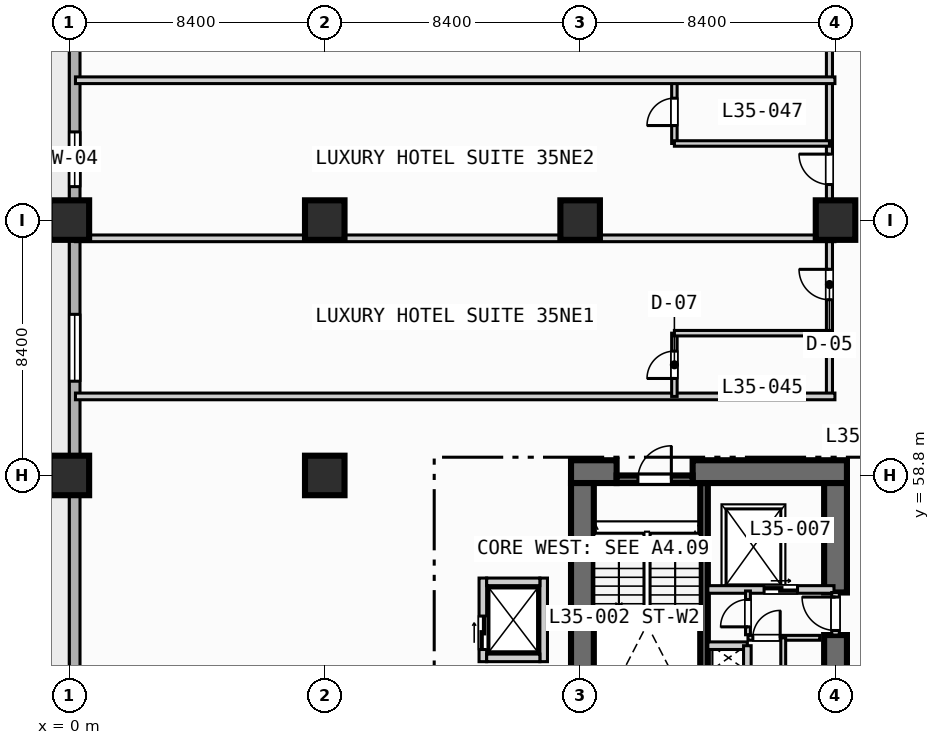
"""IFC4 building model, lengths in metres.
Left out: names, types, materials, properties, quantities, classifications, styles, units other than length and angle.
Written with IfcOpenShell. Run it as: python <this file> out.ifc"""

import sys

from ifc_helpers import new_model, si_unit, direction, frame, frame_2d, origin, origin_2d, place, context, subcontext, project, spatial, rectangle, extrude, element, fill, save


model = new_model("IFC4")
c1 = context("Model", 3, precision=1e-05, world=origin(), true_north=direction((0.0, 1.0)))
c2 = subcontext(c1, "Body", "Model", "MODEL_VIEW")
j1 = project(units=[si_unit("LENGTHUNIT", "METRE"), si_unit("PLANEANGLEUNIT", "RADIAN")], contexts=[c1])
p1 = place(None, origin())
s1 = spatial("IfcSite", under=j1, at=p1, CompositionType="ELEMENT")
p2 = place(p1, origin())
s2 = spatial("IfcBuilding", under=s1, at=p2, CompositionType="ELEMENT")
p3 = place(p2, frame((0.0, 0.0, 145.6)))
s3 = spatial("IfcBuildingStorey", under=s2, at=p3, CompositionType="ELEMENT", Elevation=145.6)
p4 = place(p3, frame((20.875, 50.5, 0.0), z_axis=(0.0, 0.0, 1.0), x_axis=(0.0, 1.0, 0.0)))
e1 = element("IfcWall", 1, at=p4, inside=s3, PredefinedType="SOLIDWALL", context=c2, shape_type="SweptSolid", body=[
    extrude(rectangle(XDim=8.05, YDim=0.25, at=frame_2d((4.025, 0.0))), origin(), (0.0, 0.0, 1.0), 3.55),
])
p5 = place(p3, frame((16.5, 58.925, 0.0), z_axis=(0.0, 0.0, 1.0), x_axis=(1.0, 0.0, 0.0)))
e2 = element("IfcWall", 2, at=p5, inside=s3, PredefinedType="SHEAR", context=c2, shape_type="SweptSolid", body=[
    extrude(rectangle(XDim=1.5, YDim=0.75, at=frame_2d((0.75, 0.0))), origin(), (0.0, 0.0, 1.0), 3.55),
])
p6 = place(p3, frame((20.5, 58.925, 0.0), z_axis=(0.0, 0.0, 1.0), x_axis=(1.0, 0.0, 0.0)))
e3 = element("IfcWall", 3, at=p6, inside=s3, PredefinedType="SHEAR", context=c2, shape_type="SweptSolid", body=[
    extrude(rectangle(XDim=5.075, YDim=0.75, at=frame_2d((2.538, 0.0))), origin(), (0.0, 0.0, 1.0), 3.55),
])
p7 = place(p3, frame((16.875, 42.2, 0.0), z_axis=(0.0, 0.0, 1.0), x_axis=(0.0, 1.0, 0.0)))
e4 = element("IfcWall", 4, at=p7, inside=s3, PredefinedType="SHEAR", context=c2, shape_type="SweptSolid", body=[
    extrude(rectangle(XDim=16.35, YDim=0.75, at=frame_2d((8.175, 0.0))), origin(), (0.0, 0.0, 1.0), 3.55),
])
p8 = place(p3, frame((25.2, 52.28, 0.0), z_axis=(0.0, 0.0, 1.0), x_axis=(0.0, 1.0, 0.0)))
e5 = element("IfcWall", 5, at=p8, inside=s3, PredefinedType="SHEAR", context=c2, shape_type="SweptSolid", body=[
    extrude(rectangle(XDim=1.27, YDim=0.75, at=frame_2d((0.635, 0.0))), origin(), (0.0, 0.0, 1.0), 3.55),
])
p9 = place(p3, frame((25.2, 54.95, 0.0), z_axis=(0.0, 0.0, 1.0), x_axis=(0.0, 1.0, 0.0)))
e6 = element("IfcWall", 6, at=p9, inside=s3, PredefinedType="SHEAR", context=c2, shape_type="SweptSolid", body=[
    extrude(rectangle(XDim=3.6, YDim=0.75, at=frame_2d((1.8, 0.0))), origin(), (0.0, 0.0, 1.0), 3.55),
])
for number, where, z_axis, x_axis in (
    (7, (0.0, 58.8, 0.0), (0.0, 0.0, 1.0), (1.0, 0.0, 0.0)),
    (8, (0.0, 67.2, 0.0), (0.0, 0.0, 1.0), (1.0, 0.0, 0.0)),
    (9, (8.4, 58.8, 0.0), (0.0, 0.0, 1.0), (1.0, 0.0, 0.0)),
    (10, (8.4, 67.2, 0.0), (0.0, 0.0, 1.0), (1.0, 0.0, 0.0)),
    (11, (16.8, 67.2, 0.0), (0.0, 0.0, 1.0), (1.0, 0.0, 0.0)),
    (12, (25.2, 67.2, 0.0), (0.0, 0.0, 1.0), (1.0, 0.0, 0.0)),
):
    element("IfcColumn", number, at=place(p3, frame(where, z_axis=z_axis, x_axis=x_axis)), inside=s3, PredefinedType="COLUMN", context=c2, shape_type="SweptSolid", body=[
        extrude(rectangle(XDim=1.3, YDim=1.3, at=origin_2d()), origin(), (0.0, 0.0, 1.0), 3.8),
    ])
p10 = place(p3, frame((0.175, 3.175, 0.0), z_axis=(0.0, 0.0, 1.0), x_axis=(0.0, 1.0, 0.0)))
e13 = element("IfcWall", 13, at=p10, inside=s3, PredefinedType="STANDARD", context=c2, shape_type="SweptSolid", body=[
    extrude(rectangle(XDim=86.05, YDim=0.35, at=frame_2d((43.025, 0.0))), origin(), (0.0, 0.0, 1.0), 3.55),
])
p11 = place(p10, frame((42.325, 0.0, 0.0)))
e14 = element("IfcOpeningElement", 14, at=p11, cuts=e13, PredefinedType="OPENING", context=c2, shape_type="SweptSolid", body=[
    extrude(rectangle(XDim=1.4, YDim=2.2, at=frame_2d((0.7, 1.1))), frame((0.0, 0.185, 0.0), z_axis=(0.0, -1.0, 0.0), x_axis=(1.0, 0.0, 0.0)), (0.0, 0.0, 1.0), 0.37),
])
p12 = place(p10, frame((25.125, 0.0, 0.85)))
e15 = element("IfcOpeningElement", 15, at=p12, cuts=e13, PredefinedType="OPENING", context=c2, shape_type="SweptSolid", body=[
    extrude(rectangle(XDim=2.2, YDim=1.8, at=frame_2d((1.1, 0.9))), frame((0.0, 0.185, 0.0), z_axis=(0.0, -1.0, 0.0), x_axis=(1.0, 0.0, 0.0)), (0.0, 0.0, 1.0), 0.37),
])
p13 = place(p10, frame((33.525, 0.0, 0.85)))
e16 = element("IfcOpeningElement", 16, at=p13, cuts=e13, PredefinedType="OPENING", context=c2, shape_type="SweptSolid", body=[
    extrude(rectangle(XDim=2.2, YDim=1.8, at=frame_2d((1.1, 0.9))), frame((0.0, 0.185, 0.0), z_axis=(0.0, -1.0, 0.0), x_axis=(1.0, 0.0, 0.0)), (0.0, 0.0, 1.0), 0.37),
])
p14 = place(p10, frame((58.725, 0.0, 0.85)))
e17 = element("IfcOpeningElement", 17, at=p14, cuts=e13, PredefinedType="OPENING", context=c2, shape_type="SweptSolid", body=[
    extrude(rectangle(XDim=2.2, YDim=1.8, at=frame_2d((1.1, 0.9))), frame((0.0, 0.185, 0.0), z_axis=(0.0, -1.0, 0.0), x_axis=(1.0, 0.0, 0.0)), (0.0, 0.0, 1.0), 0.37),
])
p15 = place(p10, frame((65.125, 0.0, 0.85)))
e18 = element("IfcOpeningElement", 18, at=p15, cuts=e13, PredefinedType="OPENING", context=c2, shape_type="SweptSolid", body=[
    extrude(rectangle(XDim=1.8, YDim=1.8, at=frame_2d((0.9, 0.9))), frame((0.0, 0.185, 0.0), z_axis=(0.0, -1.0, 0.0), x_axis=(1.0, 0.0, 0.0)), (0.0, 0.0, 1.0), 0.37),
])
p16 = place(p10, frame((73.275, 0.0, 0.85)))
e19 = element("IfcOpeningElement", 19, at=p16, cuts=e13, PredefinedType="OPENING", context=c2, shape_type="SweptSolid", body=[
    extrude(rectangle(XDim=1.8, YDim=1.8, at=frame_2d((0.9, 0.9))), frame((0.0, 0.185, 0.0), z_axis=(0.0, -1.0, 0.0), x_axis=(1.0, 0.0, 0.0)), (0.0, 0.0, 1.0), 0.37),
])
p17 = place(p10, frame((81.625, 0.0, 0.85)))
e20 = element("IfcOpeningElement", 20, at=p17, cuts=e13, PredefinedType="OPENING", context=c2, shape_type="SweptSolid", body=[
    extrude(rectangle(XDim=1.8, YDim=1.8, at=frame_2d((0.9, 0.9))), frame((0.0, 0.185, 0.0), z_axis=(0.0, -1.0, 0.0), x_axis=(1.0, 0.0, 0.0)), (0.0, 0.0, 1.0), 0.37),
])
p18 = place(p3, frame((18.0, 58.675, 0.0), z_axis=(0.0, 0.0, 1.0), x_axis=(1.0, 0.0, 0.0)))
e21 = element("IfcWall", 21, at=p18, inside=s3, PredefinedType="SOLIDWALL", context=c2, shape_type="SweptSolid", body=[
    extrude(rectangle(XDim=2.5, YDim=0.25, at=frame_2d((1.25, 0.0))), origin(), (0.0, 0.0, 1.0), 3.55),
])
p19 = place(p18, frame((0.7, 0.0, 0.0)))
e22 = element("IfcOpeningElement", 22, at=p19, cuts=e21, PredefinedType="OPENING", context=c2, shape_type="SweptSolid", body=[
    extrude(rectangle(XDim=1.1, YDim=2.15, at=frame_2d((0.55, 1.075))), frame((0.0, 0.135, 0.0), z_axis=(0.0, -1.0, 0.0), x_axis=(1.0, 0.0, 0.0)), (0.0, 0.0, 1.0), 0.27),
])
p20 = place(p3, frame((21.0, 55.05, 0.0), z_axis=(0.0, 0.0, 1.0), x_axis=(1.0, 0.0, 0.0)))
e23 = element("IfcWall", 23, at=p20, inside=s3, PredefinedType="SOLIDWALL", context=c2, shape_type="SweptSolid", body=[
    extrude(rectangle(XDim=4.15, YDim=0.25, at=frame_2d((2.075, 0.0))), origin(), (0.0, 0.0, 1.0), 3.55),
])
p21 = place(p20, frame((1.85, 0.0, 0.0)))
e24 = element("IfcOpeningElement", 24, at=p21, cuts=e23, PredefinedType="OPENING", context=c2, shape_type="SweptSolid", body=[
    extrude(rectangle(XDim=1.1, YDim=2.15, at=frame_2d((0.55, 1.075))), frame((0.0, 0.135, 0.0), z_axis=(0.0, -1.0, 0.0), x_axis=(1.0, 0.0, 0.0)), (0.0, 0.0, 1.0), 0.27),
])
p22 = place(p3, frame((25.2, 53.55, 0.0), z_axis=(0.0, 0.0, 1.0), x_axis=(0.0, 1.0, 0.0)))
e25 = element("IfcWall", 25, at=p22, inside=s3, PredefinedType="SOLIDWALL", context=c2, shape_type="SweptSolid", body=[
    extrude(rectangle(XDim=1.4, YDim=0.25, at=frame_2d((0.7, 0.0))), origin(), (0.0, 0.0, 1.0), 3.55),
])
p23 = place(p22, frame((0.15, 0.0, 0.0)))
e26 = element("IfcOpeningElement", 26, at=p23, cuts=e25, PredefinedType="OPENING", context=c2, shape_type="SweptSolid", body=[
    extrude(rectangle(XDim=1.1, YDim=2.15, at=frame_2d((0.55, 1.075))), frame((0.0, 0.135, 0.0), z_axis=(0.0, -1.0, 0.0), x_axis=(1.0, 0.0, 0.0)), (0.0, 0.0, 1.0), 0.27),
])
p24 = place(p3, frame((21.0, 53.2, 0.0), z_axis=(0.0, 0.0, 1.0), x_axis=(1.0, 0.0, 0.0)))
e27 = element("IfcWall", 27, at=p24, inside=s3, PredefinedType="SOLIDWALL", context=c2, shape_type="SweptSolid", body=[
    extrude(rectangle(XDim=1.3, YDim=0.25, at=frame_2d((0.65, 0.0))), origin(), (0.0, 0.0, 1.0), 3.55),
])
p25 = place(p3, frame((22.3, 52.36, 0.0), z_axis=(0.0, 0.0, 1.0), x_axis=(0.0, 1.0, 0.0)))
e28 = element("IfcWall", 28, at=p25, inside=s3, PredefinedType="SOLIDWALL", context=c2, shape_type="SweptSolid", body=[
    extrude(rectangle(XDim=0.84, YDim=0.25, at=frame_2d((0.42, 0.0))), origin(), (0.0, 0.0, 1.0), 3.55),
])
p26 = place(p3, frame((22.32, 53.56, 0.0), z_axis=(0.0, 0.0, 1.0), x_axis=(0.0, 1.0, 0.0)))
e29 = element("IfcWall", 29, at=p26, inside=s3, PredefinedType="PARTITIONING", context=c2, shape_type="SweptSolid", body=[
    extrude(rectangle(XDim=1.44, YDim=0.16, at=frame_2d((0.72, 0.0))), origin(), (0.0, 0.0, 1.0), 3.55),
])
p27 = place(p26, frame((0.26, 0.0, 0.0)))
e30 = element("IfcOpeningElement", 30, at=p27, cuts=e29, PredefinedType="OPENING", context=c2, shape_type="SweptSolid", body=[
    extrude(rectangle(XDim=0.9, YDim=2.1, at=frame_2d((0.45, 1.05))), frame((0.0, 0.09, 0.0), z_axis=(0.0, -1.0, 0.0), x_axis=(1.0, 0.0, 0.0)), (0.0, 0.0, 1.0), 0.18),
])
p28 = place(p3, frame((22.32, 53.46, 0.0), z_axis=(0.0, 0.0, 1.0), x_axis=(1.0, 0.0, 0.0)))
e31 = element("IfcWall", 31, at=p28, inside=s3, PredefinedType="PARTITIONING", context=c2, shape_type="SweptSolid", body=[
    extrude(rectangle(XDim=2.36, YDim=0.16, at=frame_2d((1.18, 0.0))), origin(), (0.0, 0.0, 1.0), 3.55),
])
p29 = place(p28, frame((0.16, 0.0, 0.0)))
e32 = element("IfcOpeningElement", 32, at=p29, cuts=e31, PredefinedType="OPENING", context=c2, shape_type="SweptSolid", body=[
    extrude(rectangle(XDim=0.9, YDim=2.1, at=frame_2d((0.45, 1.05))), frame((0.0, 0.09, 0.0), z_axis=(0.0, -1.0, 0.0), x_axis=(1.0, 0.0, 0.0)), (0.0, 0.0, 1.0), 0.18),
])
p30 = place(p3, frame((23.48, 52.36, 0.0), z_axis=(0.0, 0.0, 1.0), x_axis=(0.0, 1.0, 0.0)))
e33 = element("IfcWall", 33, at=p30, inside=s3, PredefinedType="PARTITIONING", context=c2, shape_type="SweptSolid", body=[
    extrude(rectangle(XDim=1.1, YDim=0.16, at=frame_2d((0.55, 0.0))), origin(), (0.0, 0.0, 1.0), 3.55),
])
p31 = place(p3, frame((13.6, 52.675, 0.0), z_axis=(0.0, 0.0, 1.0), x_axis=(0.0, 1.0, 0.0)))
e34 = element("IfcWall", 34, at=p31, inside=s3, PredefinedType="SOLIDWALL", context=c2, shape_type="SweptSolid", body=[
    extrude(rectangle(XDim=2.75, YDim=0.25, at=frame_2d((1.375, 0.0))), origin(), (0.0, 0.0, 1.0), 3.55),
])
p32 = place(p31, frame((0.4, 0.0, 0.0)))
e35 = element("IfcOpeningElement", 35, at=p32, cuts=e34, PredefinedType="OPENING", context=c2, shape_type="SweptSolid", body=[
    extrude(rectangle(XDim=1.1, YDim=2.15, at=frame_2d((0.55, 1.075))), frame((0.0, 0.135, 0.0), z_axis=(0.0, -1.0, 0.0), x_axis=(1.0, 0.0, 0.0)), (0.0, 0.0, 1.0), 0.27),
])
p33 = place(p3, frame((15.6, 52.675, 0.0), z_axis=(0.0, 0.0, 1.0), x_axis=(0.0, 1.0, 0.0)))
e36 = element("IfcWall", 36, at=p33, inside=s3, PredefinedType="SOLIDWALL", context=c2, shape_type="SweptSolid", body=[
    extrude(rectangle(XDim=2.75, YDim=0.25, at=frame_2d((1.375, 0.0))), origin(), (0.0, 0.0, 1.0), 3.55),
])
for number, where, z_axis, x_axis in (
    (37, (13.725, 52.8, 0.0), (0.0, 0.0, 1.0), (1.0, 0.0, 0.0)),
    (38, (13.725, 55.3, 0.0), (0.0, 0.0, 1.0), (1.0, 0.0, 0.0)),
):
    element("IfcWall", number, at=place(p3, frame(where, z_axis=z_axis, x_axis=x_axis)), inside=s3, PredefinedType="SOLIDWALL", context=c2, shape_type="SweptSolid", body=[
        extrude(rectangle(XDim=1.75, YDim=0.25, at=frame_2d((0.875, 0.0))), origin(), (0.0, 0.0, 1.0), 3.55),
    ])
p34 = place(p3, frame((25.0, 61.4, 0.0), z_axis=(0.0, 0.0, 1.0), x_axis=(0.0, 1.0, 0.0)))
e39 = element("IfcWall", 39, at=p34, inside=s3, PredefinedType="PARTITIONING", context=c2, shape_type="SweptSolid", body=[
    extrude(rectangle(XDim=27.6, YDim=0.2, at=frame_2d((13.8, 0.0))), origin(), (0.0, 0.0, 1.0), 2.8),
])
p35 = place(p34, frame((3.18, 0.0, 0.0)))
e40 = element("IfcOpeningElement", 40, at=p35, cuts=e39, PredefinedType="OPENING", context=c2, shape_type="SweptSolid", body=[
    extrude(rectangle(XDim=1.0, YDim=2.15, at=frame_2d((0.5, 1.075))), frame((0.0, 0.11, 0.0), z_axis=(0.0, -1.0, 0.0), x_axis=(1.0, 0.0, 0.0)), (0.0, 0.0, 1.0), 0.22),
])
p36 = place(p34, frame((6.97, 0.0, 0.0)))
e41 = element("IfcOpeningElement", 41, at=p36, cuts=e39, PredefinedType="OPENING", context=c2, shape_type="SweptSolid", body=[
    extrude(rectangle(XDim=1.0, YDim=2.15, at=frame_2d((0.5, 1.075))), frame((0.0, 0.11, 0.0), z_axis=(0.0, -1.0, 0.0), x_axis=(1.0, 0.0, 0.0)), (0.0, 0.0, 1.0), 0.22),
])
p37 = place(p34, frame((12.035, 0.0, 0.0)))
e42 = element("IfcOpeningElement", 42, at=p37, cuts=e39, PredefinedType="OPENING", context=c2, shape_type="SweptSolid", body=[
    extrude(rectangle(XDim=1.0, YDim=2.15, at=frame_2d((0.5, 1.075))), frame((0.0, 0.11, 0.0), z_axis=(0.0, -1.0, 0.0), x_axis=(1.0, 0.0, 0.0)), (0.0, 0.0, 1.0), 0.22),
])
p38 = place(p34, frame((20.385, 0.0, 0.0)))
e43 = element("IfcOpeningElement", 43, at=p38, cuts=e39, PredefinedType="OPENING", context=c2, shape_type="SweptSolid", body=[
    extrude(rectangle(XDim=1.0, YDim=2.15, at=frame_2d((0.5, 1.075))), frame((0.0, 0.11, 0.0), z_axis=(0.0, -1.0, 0.0), x_axis=(1.0, 0.0, 0.0)), (0.0, 0.0, 1.0), 0.22),
])
p39 = place(p3, frame((0.2, 61.4, 0.0), z_axis=(0.0, 0.0, 1.0), x_axis=(1.0, 0.0, 0.0)))
e44 = element("IfcWall", 44, at=p39, inside=s3, PredefinedType="PARTITIONING", context=c2, shape_type="SweptSolid", body=[
    extrude(rectangle(XDim=24.98, YDim=0.22, at=frame_2d((12.49, 0.0))), origin(), (0.0, 0.0, 1.0), 3.55),
])
p40 = place(p3, frame((19.9, 61.4, 0.0), z_axis=(0.0, 0.0, 1.0), x_axis=(0.0, 1.0, 0.0)))
e45 = element("IfcWall", 45, at=p40, inside=s3, PredefinedType="PLUMBINGWALL", context=c2, shape_type="SweptSolid", body=[
    extrude(rectangle(XDim=2.08, YDim=0.18, at=frame_2d((1.04, 0.0))), origin(), (0.0, 0.0, 1.0), 3.55),
])
p41 = place(p40, frame((0.59, 0.0, 0.0)))
e46 = element("IfcOpeningElement", 46, at=p41, cuts=e45, PredefinedType="OPENING", context=c2, shape_type="SweptSolid", body=[
    extrude(rectangle(XDim=0.9, YDim=2.1, at=frame_2d((0.45, 1.05))), frame((0.0, 0.1, 0.0), z_axis=(0.0, -1.0, 0.0), x_axis=(1.0, 0.0, 0.0)), (0.0, 0.0, 1.0), 0.2),
])
p42 = place(p3, frame((19.9, 63.48, 0.0), z_axis=(0.0, 0.0, 1.0), x_axis=(1.0, 0.0, 0.0)))
e47 = element("IfcWall", 47, at=p42, inside=s3, PredefinedType="PLUMBINGWALL", context=c2, shape_type="SweptSolid", body=[
    extrude(rectangle(XDim=5.1, YDim=0.18, at=frame_2d((2.55, 0.0))), origin(), (0.0, 0.0, 1.0), 3.55),
])
p43 = place(p3, frame((0.2, 66.6, 0.0), z_axis=(0.0, 0.0, 1.0), x_axis=(1.0, 0.0, 0.0)))
e48 = element("IfcWall", 48, at=p43, inside=s3, PredefinedType="PARTITIONING", context=c2, shape_type="SweptSolid", body=[
    extrude(rectangle(XDim=24.98, YDim=0.22, at=frame_2d((12.49, 0.0))), origin(), (0.0, 0.0, 1.0), 3.55),
])
p44 = place(p3, frame((19.9, 69.72, 0.0), z_axis=(0.0, 0.0, 1.0), x_axis=(0.0, 1.0, 0.0)))
e49 = element("IfcWall", 49, at=p44, inside=s3, PredefinedType="PLUMBINGWALL", context=c2, shape_type="SweptSolid", body=[
    extrude(rectangle(XDim=2.08, YDim=0.18, at=frame_2d((1.04, 0.0))), origin(), (0.0, 0.0, 1.0), 3.55),
])
p45 = place(p44, frame((0.59, 0.0, 0.0)))
e50 = element("IfcOpeningElement", 50, at=p45, cuts=e49, PredefinedType="OPENING", context=c2, shape_type="SweptSolid", body=[
    extrude(rectangle(XDim=0.9, YDim=2.1, at=frame_2d((0.45, 1.05))), frame((0.0, 0.1, 0.0), z_axis=(0.0, -1.0, 0.0), x_axis=(1.0, 0.0, 0.0)), (0.0, 0.0, 1.0), 0.2),
])
p46 = place(p3, frame((19.9, 69.72, 0.0), z_axis=(0.0, 0.0, 1.0), x_axis=(1.0, 0.0, 0.0)))
e51 = element("IfcWall", 51, at=p46, inside=s3, PredefinedType="PLUMBINGWALL", context=c2, shape_type="SweptSolid", body=[
    extrude(rectangle(XDim=5.1, YDim=0.18, at=frame_2d((2.55, 0.0))), origin(), (0.0, 0.0, 1.0), 3.55),
])
p47 = place(p3, frame((0.2, 71.8, 0.0), z_axis=(0.0, 0.0, 1.0), x_axis=(1.0, 0.0, 0.0)))
e52 = element("IfcWall", 52, at=p47, inside=s3, PredefinedType="PARTITIONING", context=c2, shape_type="SweptSolid", body=[
    extrude(rectangle(XDim=24.98, YDim=0.22, at=frame_2d((12.49, 0.0))), origin(), (0.0, 0.0, 1.0), 3.55),
])
p48 = place(p14, origin())
e53 = element("IfcWindow", 53, at=p48, inside=s3, PartitioningType="SINGLE_PANEL", PredefinedType="WINDOW", context=c2, shape_type="SweptSolid", body=[
    extrude(rectangle(XDim=2.2, YDim=1.8, at=frame_2d((1.1, 0.9))), frame((0.0, 0.03, 0.0), z_axis=(0.0, -1.0, 0.0), x_axis=(1.0, 0.0, 0.0)), (0.0, 0.0, 1.0), 0.06),
])
fill(e17, e53)
p49 = place(p15, origin())
e54 = element("IfcWindow", 54, at=p49, inside=s3, PartitioningType="SINGLE_PANEL", PredefinedType="WINDOW", context=c2, shape_type="SweptSolid", body=[
    extrude(rectangle(XDim=1.8, YDim=1.8, at=frame_2d((0.9, 0.9))), frame((0.0, 0.03, 0.0), z_axis=(0.0, -1.0, 0.0), x_axis=(1.0, 0.0, 0.0)), (0.0, 0.0, 1.0), 0.06),
])
fill(e18, e54)
p50 = place(p19, origin())
e55 = element("IfcDoor", 55, at=p50, inside=s3, OperationType="SINGLE_SWING_RIGHT", PredefinedType="DOOR", context=c2, shape_type="SweptSolid", body=[
    extrude(rectangle(XDim=1.1, YDim=2.15, at=frame_2d((0.55, 1.075))), frame((0.0, 0.025, 0.0), z_axis=(0.0, -1.0, 0.0), x_axis=(1.0, 0.0, 0.0)), (0.0, 0.0, 1.0), 0.05),
])
fill(e22, e55)
p51 = place(p21, origin())
e56 = element("IfcDoor", 56, at=p51, inside=s3, OperationType="SLIDING_TO_LEFT", PredefinedType="DOOR", context=c2, shape_type="SweptSolid", body=[
    extrude(rectangle(XDim=1.1, YDim=2.15, at=frame_2d((0.55, 1.075))), frame((0.0, 0.025, 0.0), z_axis=(0.0, -1.0, 0.0), x_axis=(1.0, 0.0, 0.0)), (0.0, 0.0, 1.0), 0.05),
])
fill(e24, e56)
p52 = place(p23, origin())
e57 = element("IfcDoor", 57, at=p52, inside=s3, OperationType="SINGLE_SWING_RIGHT", PredefinedType="DOOR", context=c2, shape_type="SweptSolid", body=[
    extrude(rectangle(XDim=1.1, YDim=2.15, at=frame_2d((0.55, 1.075))), frame((0.0, 0.025, 0.0), z_axis=(0.0, -1.0, 0.0), x_axis=(1.0, 0.0, 0.0)), (0.0, 0.0, 1.0), 0.05),
])
fill(e26, e57)
p53 = place(p27, origin())
e58 = element("IfcDoor", 58, at=p53, inside=s3, OperationType="SINGLE_SWING_LEFT", PredefinedType="DOOR", context=c2, shape_type="SweptSolid", body=[
    extrude(rectangle(XDim=0.9, YDim=2.1, at=frame_2d((0.45, 1.05))), frame((0.0, 0.025, 0.0), z_axis=(0.0, -1.0, 0.0), x_axis=(1.0, 0.0, 0.0)), (0.0, 0.0, 1.0), 0.05),
])
fill(e30, e58)
p54 = place(p29, origin())
e59 = element("IfcDoor", 59, at=p54, inside=s3, OperationType="SINGLE_SWING_RIGHT", PredefinedType="DOOR", context=c2, shape_type="SweptSolid", body=[
    extrude(rectangle(XDim=0.9, YDim=2.1, at=frame_2d((0.45, 1.05))), frame((0.0, 0.025, 0.0), z_axis=(0.0, -1.0, 0.0), x_axis=(1.0, 0.0, 0.0)), (0.0, 0.0, 1.0), 0.05),
])
fill(e32, e59)
p55 = place(p32, origin())
e60 = element("IfcDoor", 60, at=p55, inside=s3, OperationType="SLIDING_TO_LEFT", PredefinedType="DOOR", context=c2, shape_type="SweptSolid", body=[
    extrude(rectangle(XDim=1.1, YDim=2.15, at=frame_2d((0.55, 1.075))), frame((0.0, 0.025, 0.0), z_axis=(0.0, -1.0, 0.0), x_axis=(1.0, 0.0, 0.0)), (0.0, 0.0, 1.0), 0.05),
])
fill(e35, e60)
p56 = place(p35, origin())
e61 = element("IfcDoor", 61, at=p56, inside=s3, OperationType="SINGLE_SWING_RIGHT", PredefinedType="DOOR", context=c2, shape_type="SweptSolid", body=[
    extrude(rectangle(XDim=1.0, YDim=2.15, at=frame_2d((0.5, 1.075))), frame((0.0, 0.025, 0.0), z_axis=(0.0, -1.0, 0.0), x_axis=(1.0, 0.0, 0.0)), (0.0, 0.0, 1.0), 0.05),
])
fill(e40, e61)
p57 = place(p36, origin())
e62 = element("IfcDoor", 62, at=p57, inside=s3, OperationType="SINGLE_SWING_RIGHT", PredefinedType="DOOR", context=c2, shape_type="SweptSolid", body=[
    extrude(rectangle(XDim=1.0, YDim=2.15, at=frame_2d((0.5, 1.075))), frame((0.0, 0.025, 0.0), z_axis=(0.0, -1.0, 0.0), x_axis=(1.0, 0.0, 0.0)), (0.0, 0.0, 1.0), 0.05),
])
fill(e41, e62)
p58 = place(p41, origin())
e63 = element("IfcDoor", 63, at=p58, inside=s3, OperationType="SINGLE_SWING_LEFT", PredefinedType="DOOR", context=c2, shape_type="SweptSolid", body=[
    extrude(rectangle(XDim=0.9, YDim=2.1, at=frame_2d((0.45, 1.05))), frame((0.0, 0.025, 0.0), z_axis=(0.0, -1.0, 0.0), x_axis=(1.0, 0.0, 0.0)), (0.0, 0.0, 1.0), 0.05),
])
fill(e46, e63)
p59 = place(p45, origin())
e64 = element("IfcDoor", 64, at=p59, inside=s3, OperationType="SINGLE_SWING_LEFT", PredefinedType="DOOR", context=c2, shape_type="SweptSolid", body=[
    extrude(rectangle(XDim=0.9, YDim=2.1, at=frame_2d((0.45, 1.05))), frame((0.0, 0.025, 0.0), z_axis=(0.0, -1.0, 0.0), x_axis=(1.0, 0.0, 0.0)), (0.0, 0.0, 1.0), 0.05),
])
fill(e50, e64)
save(model, sys.argv[1])
